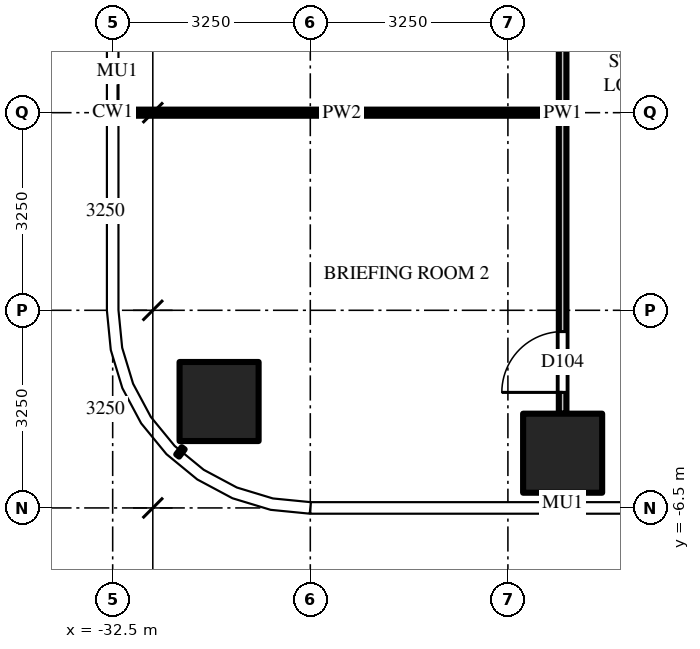
"""IFC4 building model, lengths in metres.
Left out: names, types, materials, properties, quantities, classifications, styles, units other than length and angle.
Written with IfcOpenShell. Run it as: python <this file> out.ifc"""

import sys

from ifc_helpers import new_model, si_unit, direction, frame, frame_2d, origin, origin_2d, place, context, subcontext, project, spatial, rectangle, extrude, source, transform, mapped, element, fill, save


model = new_model("IFC4")
c1 = context("Model", 3, precision=1e-05, world=origin(), true_north=direction((0.0, 1.0)))
c2 = subcontext(c1, "Body", "Model", "MODEL_VIEW")
j1 = project(units=[si_unit("LENGTHUNIT", "METRE"), si_unit("PLANEANGLEUNIT", "RADIAN")], contexts=[c1])
p1 = place(None, origin())
s1 = spatial("IfcSite", under=j1, at=p1, CompositionType="ELEMENT")
p2 = place(p1, origin())
s2 = spatial("IfcBuilding", under=s1, at=p2, CompositionType="ELEMENT")
p3 = place(p2, frame((0.0, 0.0, 142.5)))
s3 = spatial("IfcBuildingStorey", under=s2, at=p3, CompositionType="ELEMENT", Elevation=142.5)
m1 = source(origin(), c2, "Body", "SweptSolid", [
    extrude(rectangle(XDim=1.3, YDim=1.3, at=origin_2d()), origin(), (0.0, 0.0, 1.0), 4.5),
])
for number, where, z_axis, x_axis in (
    (1, (-25.1, -5.6, 0.0), (0.0, 0.0, 1.0), (1.0, 0.0, 0.0)),
    (2, (-30.75, -4.75, 0.0), (0.0, 0.0, 1.0), (1.0, 0.0, 0.0)),
):
    element("IfcColumn", number, at=place(p3, frame(where, z_axis=z_axis, x_axis=x_axis)), inside=s3, PredefinedType="COLUMN", context=c2, shape_type="MappedRepresentation", body=[
        mapped(m1, transform((0.0, 0.0, 0.0))),
    ])
m2 = source(origin(), c2, "Body", "SweptSolid", [
    extrude(rectangle(XDim=9.9, YDim=0.125, at=frame_2d((4.95, 0.0))), origin(), (0.0, 0.0, 1.0), 3.468),
])
p4 = place(p3, frame((-25.1, -4.95, 0.0), z_axis=(0.0, 0.0, 1.0), x_axis=(0.0, 1.0, 0.0)))
e3 = element("IfcWall", 3, at=p4, inside=s3, PredefinedType="PARTITIONING", context=c2, shape_type="MappedRepresentation", body=[
    mapped(m2, transform((0.0, 0.0, 0.0))),
])
m3 = source(origin(), c2, "Body", "SweptSolid", [
    extrude(rectangle(XDim=1.0, YDim=2.1, at=frame_2d((0.5, 1.05))), frame((0.0, 0.073, 0.0), z_axis=(0.0, -1.0, 0.0), x_axis=(1.0, 0.0, 0.0)), (0.0, 0.0, 1.0), 0.145),
])
p5 = place(p4, frame((0.35, 0.0, 0.0)))
e4 = element("IfcOpeningElement", 4, at=p5, cuts=e3, PredefinedType="OPENING", context=c2, shape_type="MappedRepresentation", body=[
    mapped(m3, transform((0.0, 0.0, 0.0))),
])
p6 = place(p4, frame((8.55, 0.0, 0.0)))
e5 = element("IfcOpeningElement", 5, at=p6, cuts=e3, PredefinedType="OPENING", context=c2, shape_type="MappedRepresentation", body=[
    mapped(m3, transform((0.0, 0.0, 0.0))),
])
m4 = source(origin(), c2, "Body", "SweptSolid", [
    extrude(rectangle(XDim=7.137, YDim=0.1, at=frame_2d((3.569, 0.0))), origin(), (0.0, 0.0, 1.0), 3.33),
])
p7 = place(p3, frame((-32.3, 0.0, 0.0), z_axis=(0.0, 0.0, 1.0), x_axis=(1.0, 0.0, 0.0)))
e6 = element("IfcWall", 6, at=p7, inside=s3, PredefinedType="PARTITIONING", context=c2, shape_type="MappedRepresentation", body=[
    mapped(m4, transform((0.0, 0.0, 0.0))),
])
m5 = source(origin(), c2, "Body", "SweptSolid", [
    extrude(rectangle(XDim=1.0, YDim=2.1, at=frame_2d((0.5, 1.05))), frame((0.0, 0.025, 0.0), z_axis=(0.0, -1.0, 0.0), x_axis=(1.0, 0.0, 0.0)), (0.0, 0.0, 1.0), 0.05),
])
p8 = place(p5, origin())
e7 = element("IfcDoor", 7, at=p8, inside=s3, OperationType="SINGLE_SWING_LEFT", PredefinedType="DOOR", context=c2, shape_type="MappedRepresentation", body=[
    mapped(m5, transform((0.0, 0.0, 0.0))),
])
fill(e4, e7)
save(model, sys.argv[1])
